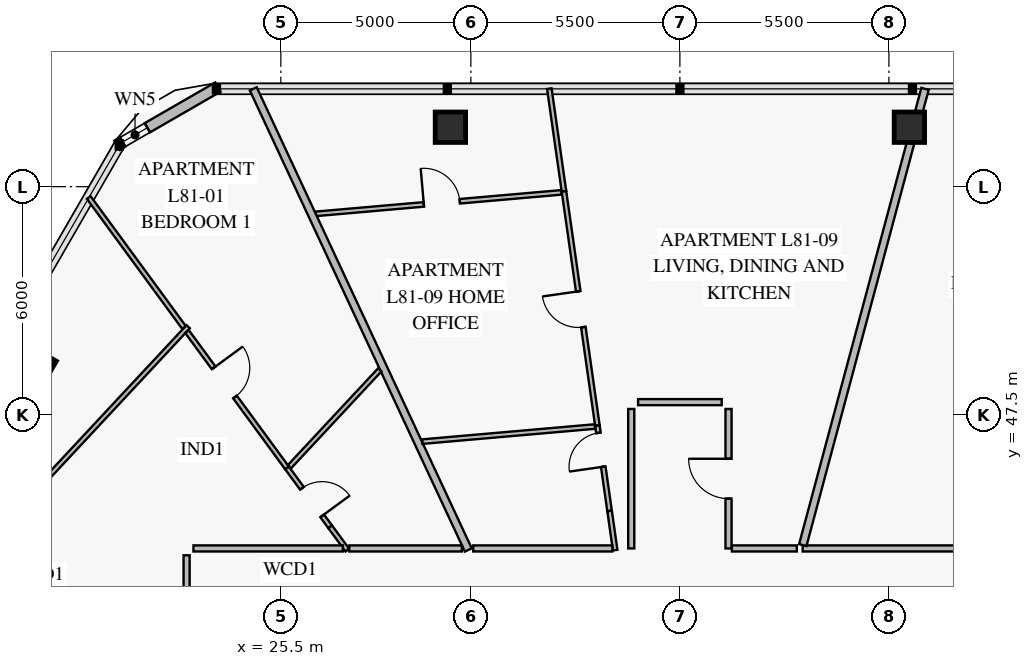
"""IFC4 building model, lengths in metres.
Left out: names, types, materials, properties, quantities, classifications, styles, units other than length and angle.
Written with IfcOpenShell. Run it as: python <this file> out.ifc"""

import sys

from ifc_helpers import new_model, si_unit, direction, frame, frame_2d, origin, origin_2d, place, context, subcontext, project, spatial, rectangle, extrude, element, fill, save


model = new_model("IFC4")
c1 = context("Model", 3, precision=1e-05, world=origin(), true_north=direction((0.0, 1.0)))
c2 = subcontext(c1, "Body", "Model", "MODEL_VIEW")
j1 = project(units=[si_unit("LENGTHUNIT", "METRE"), si_unit("PLANEANGLEUNIT", "RADIAN")], contexts=[c1])
p1 = place(None, origin())
s1 = spatial("IfcSite", under=j1, at=p1, CompositionType="ELEMENT")
p2 = place(p1, origin())
s2 = spatial("IfcBuilding", under=s1, at=p2, CompositionType="ELEMENT")
p3 = place(p2, frame((0.0, 0.0, 319.6)))
s3 = spatial("IfcBuildingStorey", under=s2, at=p3, CompositionType="ELEMENT", Elevation=319.6)
for number, where, z_axis, x_axis in (
    (1, (42.039, 55.064, 0.0), (0.0, 0.0, 1.0), (-1.0, 0.0, 0.0)),
    (2, (29.961, 55.064, 0.0), (0.0, 0.0, 1.0), (-1.0, 0.0, 0.0)),
    (3, (19.045, 48.762, 0.0), (0.0, 0.0, 1.0), (-0.5, -0.866, 0.0)),
):
    element("IfcColumn", number, at=place(p3, frame(where, z_axis=z_axis, x_axis=x_axis)), inside=s3, PredefinedType="COLUMN", context=c2, shape_type="SweptSolid", body=[
        extrude(rectangle(XDim=0.8, YDim=0.8, at=origin_2d()), origin(), (0.0, 0.0, 1.0), 3.55),
    ])
p4 = place(p3, frame((21.189, 54.589, 0.0), z_axis=(0.0, 0.0, 1.0), x_axis=(0.866023752521, 0.50000286006, 0.0)))
e4 = element("IfcWall", 4, at=p4, inside=s3, PredefinedType="SOLIDWALL", context=c2, shape_type="SweptSolid", body=[
    extrude(rectangle(XDim=3.065, YDim=0.28, at=frame_2d((1.532, 0.0))), origin(), (0.0, 0.0, 1.0), 3.55),
])
p5 = place(p4, frame((0.173, 0.0, 0.85)))
e5 = element("IfcOpeningElement", 5, at=p5, cuts=e4, PredefinedType="OPENING", context=c2, shape_type="SweptSolid", body=[
    extrude(rectangle(XDim=0.75, YDim=1.5, at=frame_2d((0.375, 0.75))), frame((0.0, 0.152, 0.0), z_axis=(0.0, -1.0, 0.0), x_axis=(1.0, 0.0, 0.0)), (0.0, 0.0, 1.0), 0.304),
])
p6 = place(p3, frame((23.062, 49.815, 0.0), z_axis=(0.0, 0.0, 1.0), x_axis=(-0.681996709379, -0.731355240903, 0.0)))
e6 = element("IfcWall", 6, at=p6, inside=s3, PredefinedType="PARTITIONING", context=c2, shape_type="SweptSolid", body=[
    extrude(rectangle(XDim=12.826, YDim=0.12, at=frame_2d((6.413, 0.0))), origin(), (0.0, 0.0, 1.0), 2.97),
])
p7 = place(p6, frame((5.938, 0.0, 0.0)))
e7 = element("IfcOpeningElement", 7, at=p7, cuts=e6, PredefinedType="OPENING", context=c2, shape_type="SweptSolid", body=[
    extrude(rectangle(XDim=0.95, YDim=2.1, at=frame_2d((0.475, 1.05))), frame((0.0, 0.072, 0.0), z_axis=(0.0, -1.0, 0.0), x_axis=(1.0, 0.0, 0.0)), (0.0, 0.0, 1.0), 0.144),
])
p8 = place(p3, frame((26.798, 44.55, 0.0), z_axis=(0.0, 0.0, 1.0), x_axis=(-0.591341620245, 0.80642116054, 0.0)))
e8 = element("IfcWall", 8, at=p8, inside=s3, PredefinedType="PARTITIONING", context=c2, shape_type="SweptSolid", body=[
    extrude(rectangle(XDim=1.921, YDim=0.12, at=frame_2d((0.96, 0.0))), origin(), (0.0, 0.0, 1.0), 3.55),
])
p9 = place(p8, frame((0.357, 0.0, 0.0)))
e9 = element("IfcOpeningElement", 9, at=p9, cuts=e8, PredefinedType="OPENING", context=c2, shape_type="SweptSolid", body=[
    extrude(rectangle(XDim=0.9, YDim=2.1, at=frame_2d((0.45, 1.05))), frame((0.0, 0.072, 0.0), z_axis=(0.0, -1.0, 0.0), x_axis=(1.0, 0.0, 0.0)), (0.0, 0.0, 1.0), 0.144),
])
p10 = place(p3, frame((25.662, 46.099, 0.0), z_axis=(0.0, 0.0, 1.0), x_axis=(-0.591311292855, 0.806443398474, 0.0)))
e10 = element("IfcWall", 10, at=p10, inside=s3, PredefinedType="PARTITIONING", context=c2, shape_type="SweptSolid", body=[
    extrude(rectangle(XDim=4.446, YDim=0.12, at=frame_2d((2.223, 0.0))), origin(), (0.0, 0.0, 1.0), 3.55),
])
p11 = place(p10, frame((2.314, 0.0, 0.0)))
e11 = element("IfcOpeningElement", 11, at=p11, cuts=e10, PredefinedType="OPENING", context=c2, shape_type="SweptSolid", body=[
    extrude(rectangle(XDim=0.95, YDim=2.1, at=frame_2d((0.475, 1.05))), frame((0.0, 0.072, 0.0), z_axis=(0.0, -1.0, 0.0), x_axis=(1.0, 0.0, 0.0)), (0.0, 0.0, 1.0), 0.144),
])
p12 = place(p3, frame((22.951, 49.796, 0.0), z_axis=(0.0, 0.0, 1.0), x_axis=(-0.591303744842, 0.806448932875, 0.0)))
e12 = element("IfcWall", 12, at=p12, inside=s3, PredefinedType="PARTITIONING", context=c2, shape_type="SweptSolid", body=[
    extrude(rectangle(XDim=4.24, YDim=0.12, at=frame_2d((2.12, 0.0))), origin(), (0.0, 0.0, 1.0), 2.97),
])
p13 = place(p3, frame((23.02, 43.8, 0.0), z_axis=(0.0, 0.0, 1.0), x_axis=(0.0, -1.0, 0.0)))
e13 = element("IfcWall", 13, at=p13, inside=s3, PredefinedType="PARTITIONING", context=c2, shape_type="SweptSolid", body=[
    extrude(rectangle(XDim=6.666, YDim=0.16, at=frame_2d((3.333, 0.0))), origin(), (0.0, 0.0, 1.0), 3.55),
])
p14 = place(p13, frame((2.808, 0.0, 0.0)))
e14 = element("IfcOpeningElement", 14, at=p14, cuts=e13, PredefinedType="OPENING", context=c2, shape_type="SweptSolid", body=[
    extrude(rectangle(XDim=1.05, YDim=2.15, at=frame_2d((0.525, 1.075))), frame((0.0, 0.092, 0.0), z_axis=(0.0, -1.0, 0.0), x_axis=(1.0, 0.0, 0.0)), (0.0, 0.0, 1.0), 0.184),
])
p15 = place(p3, frame((48.8, 43.98, 0.0), z_axis=(0.0, 0.0, 1.0), x_axis=(-1.0, 0.0, 0.0)))
e15 = element("IfcWall", 15, at=p15, inside=s3, PredefinedType="PARTITIONING", context=c2, shape_type="SweptSolid", body=[
    extrude(rectangle(XDim=9.569, YDim=0.16, at=frame_2d((4.785, 0.0))), origin(), (0.0, 0.0, 1.0), 3.0),
])
p16 = place(p15, frame((4.21, 0.0, 0.0)))
e16 = element("IfcOpeningElement", 16, at=p16, cuts=e15, PredefinedType="OPENING", context=c2, shape_type="SweptSolid", body=[
    extrude(rectangle(XDim=1.15, YDim=2.2, at=frame_2d((0.575, 1.1))), frame((0.0, 0.092, 0.0), z_axis=(0.0, -1.0, 0.0), x_axis=(1.0, 0.0, 0.0)), (0.0, 0.0, 1.0), 0.184),
])
p17 = place(p3, frame((34.15, 44.966, 0.0), z_axis=(0.0, 0.0, 1.0), x_axis=(-0.141196039745, 0.989981655568, 0.0)))
e17 = element("IfcWall", 17, at=p17, inside=s3, PredefinedType="PARTITIONING", context=c2, shape_type="SweptSolid", body=[
    extrude(rectangle(XDim=2.275, YDim=0.12, at=frame_2d((1.138, 0.0))), origin(), (0.0, 0.0, 1.0), 3.55),
])
p18 = place(p17, frame((1.175, 0.0, 0.0)))
e18 = element("IfcOpeningElement", 18, at=p18, cuts=e17, PredefinedType="OPENING", context=c2, shape_type="SweptSolid", body=[
    extrude(rectangle(XDim=0.9, YDim=2.1, at=frame_2d((0.45, 1.05))), frame((0.0, 0.072, 0.0), z_axis=(0.0, -1.0, 0.0), x_axis=(1.0, 0.0, 0.0)), (0.0, 0.0, 1.0), 0.144),
])
p19 = place(p3, frame((33.829, 47.219, 0.0), z_axis=(0.0, 0.0, 1.0), x_axis=(-0.141245630481, 0.989974581426, 0.0)))
e19 = element("IfcWall", 19, at=p19, inside=s3, PredefinedType="PARTITIONING", context=c2, shape_type="SweptSolid", body=[
    extrude(rectangle(XDim=6.224, YDim=0.12, at=frame_2d((3.112, 0.0))), origin(), (0.0, 0.0, 1.0), 3.2),
])
p20 = place(p19, frame((2.612, 0.0, 0.0)))
e20 = element("IfcOpeningElement", 20, at=p20, cuts=e19, PredefinedType="OPENING", context=c2, shape_type="SweptSolid", body=[
    extrude(rectangle(XDim=0.95, YDim=2.1, at=frame_2d((0.475, 1.05))), frame((0.0, 0.072, 0.0), z_axis=(0.0, -1.0, 0.0), x_axis=(1.0, 0.0, 0.0)), (0.0, 0.0, 1.0), 0.144),
])
p21 = place(p3, frame((32.885, 53.35, 0.0), z_axis=(0.0, 0.0, 1.0), x_axis=(-0.996192737693, -0.087178147311, 0.0)))
e21 = element("IfcWall", 21, at=p21, inside=s3, PredefinedType="PARTITIONING", context=c2, shape_type="SweptSolid", body=[
    extrude(rectangle(XDim=6.491, YDim=0.12, at=frame_2d((3.246, 0.0))), origin(), (0.0, 0.0, 1.0), 3.0),
])
p22 = place(p21, frame((2.687, 0.0, 0.0)))
e22 = element("IfcOpeningElement", 22, at=p22, cuts=e21, PredefinedType="OPENING", context=c2, shape_type="SweptSolid", body=[
    extrude(rectangle(XDim=0.95, YDim=2.1, at=frame_2d((0.475, 1.05))), frame((0.0, 0.072, 0.0), z_axis=(0.0, -1.0, 0.0), x_axis=(1.0, 0.0, 0.0)), (0.0, 0.0, 1.0), 0.144),
])
p23 = place(p3, frame((37.28, 43.98, 0.0), z_axis=(0.0, 0.0, 1.0), x_axis=(0.0, 1.0, 0.0)))
e23 = element("IfcWall", 23, at=p23, inside=s3, PredefinedType="PARTITIONING", context=c2, shape_type="SweptSolid", body=[
    extrude(rectangle(XDim=3.67, YDim=0.16, at=frame_2d((1.835, 0.0))), origin(), (0.0, 0.0, 1.0), 3.55),
])
p24 = place(p23, frame((1.31, 0.0, 0.0)))
e24 = element("IfcOpeningElement", 24, at=p24, cuts=e23, PredefinedType="OPENING", context=c2, shape_type="SweptSolid", body=[
    extrude(rectangle(XDim=1.05, YDim=2.15, at=frame_2d((0.525, 1.075))), frame((0.0, 0.092, 0.0), z_axis=(0.0, -1.0, 0.0), x_axis=(1.0, 0.0, 0.0)), (0.0, 0.0, 1.0), 0.184),
])
p25 = place(p3, frame((30.432, 43.94, 0.0), z_axis=(0.0, 0.0, 1.0), x_axis=(-0.422611922644, 0.906310742979, 0.0)))
e25 = element("IfcWall", 25, at=p25, inside=s3, PredefinedType="PARTITIONING", context=c2, shape_type="SweptSolid", body=[
    extrude(rectangle(XDim=13.389, YDim=0.2, at=frame_2d((6.694, 0.0))), origin(), (0.0, 0.0, 1.0), 2.97),
])
p26 = place(p3, frame((27.249, 43.935, 0.0), z_axis=(0.0, 0.0, 1.0), x_axis=(-0.591099878677, 0.806598371824, 0.0)))
e26 = element("IfcWall", 26, at=p26, inside=s3, PredefinedType="PARTITIONING", context=c2, shape_type="SweptSolid", body=[
    extrude(rectangle(XDim=0.762, YDim=0.12, at=frame_2d((0.381, 0.0))), origin(), (0.0, 0.0, 1.0), 3.55),
])
p27 = place(p3, frame((28.103, 48.68, 0.0), z_axis=(0.0, 0.0, 1.0), x_axis=(-0.681964001054, -0.731385740404, 0.0)))
e27 = element("IfcWall", 27, at=p27, inside=s3, PredefinedType="PARTITIONING", context=c2, shape_type="SweptSolid", body=[
    extrude(rectangle(XDim=3.488, YDim=0.12, at=frame_2d((1.744, 0.0))), origin(), (0.0, 0.0, 1.0), 3.55),
])
p28 = place(p3, frame((39.234, 44.068, 0.0), z_axis=(0.0, 0.0, 1.0), x_axis=(0.258812989646, 0.965927448823, 0.0)))
e28 = element("IfcWall", 28, at=p28, inside=s3, PredefinedType="PARTITIONING", context=c2, shape_type="SweptSolid", body=[
    extrude(rectangle(XDim=10.949, YDim=0.2, at=frame_2d((5.475, 0.0))), origin(), (0.0, 0.0, 1.0), 3.0),
])
p29 = place(p3, frame((42.292, 55.484, 0.0), z_axis=(0.0, 0.0, 1.0), x_axis=(0.258955805871, 0.965889170974, 0.0)))
e29 = element("IfcWall", 29, at=p29, inside=s3, PredefinedType="PARTITIONING", context=c2, shape_type="SweptSolid", body=[
    extrude(rectangle(XDim=0.611, YDim=0.2, at=frame_2d((0.305, 0.0))), origin(), (0.0, 0.0, 1.0), 3.122),
])
p30 = place(p3, frame((34.297, 43.935, 0.0), z_axis=(0.0, 0.0, 1.0), x_axis=(-0.141355718114, 0.989958868316, 0.0)))
e30 = element("IfcWall", 30, at=p30, inside=s3, PredefinedType="PARTITIONING", context=c2, shape_type="SweptSolid", body=[
    extrude(rectangle(XDim=1.042, YDim=0.12, at=frame_2d((0.521, 0.0))), origin(), (0.0, 0.0, 1.0), 3.55),
])
p31 = place(p3, frame((32.949, 53.381, 0.0), z_axis=(0.0, 0.0, 1.0), x_axis=(-0.141258329488, 0.989972769499, 0.0)))
e31 = element("IfcWall", 31, at=p31, inside=s3, PredefinedType="PARTITIONING", context=c2, shape_type="SweptSolid", body=[
    extrude(rectangle(XDim=2.726, YDim=0.12, at=frame_2d((1.363, 0.0))), origin(), (0.0, 0.0, 1.0), 2.97),
])
p32 = place(p3, frame((33.764, 47.188, 0.0), z_axis=(0.0, 0.0, 1.0), x_axis=(-0.996198075211, -0.087117133479, 0.0)))
e32 = element("IfcWall", 32, at=p32, inside=s3, PredefinedType="PARTITIONING", context=c2, shape_type="SweptSolid", body=[
    extrude(rectangle(XDim=4.56, YDim=0.12, at=frame_2d((2.28, 0.0))), origin(), (0.0, 0.0, 1.0), 3.0),
])
p33 = place(p3, frame((27.132, 43.98, 0.0), z_axis=(0.0, 0.0, 1.0), x_axis=(-1.0, 0.0, 0.0)))
e33 = element("IfcWall", 33, at=p33, inside=s3, PredefinedType="PARTITIONING", context=c2, shape_type="SweptSolid", body=[
    extrude(rectangle(XDim=3.932, YDim=0.16, at=frame_2d((1.966, 0.0))), origin(), (0.0, 0.0, 1.0), 3.0),
])
p34 = place(p3, frame((30.264, 43.98, 0.0), z_axis=(0.0, 0.0, 1.0), x_axis=(-1.0, 0.0, 0.0)))
e34 = element("IfcWall", 34, at=p34, inside=s3, PredefinedType="PARTITIONING", context=c2, shape_type="SweptSolid", body=[
    extrude(rectangle(XDim=2.963, YDim=0.16, at=frame_2d((1.482, 0.0))), origin(), (0.0, 0.0, 1.0), 3.55),
])
p35 = place(p3, frame((34.72, 47.65, 0.0), z_axis=(0.0, 0.0, 1.0), x_axis=(0.0, -1.0, 0.0)))
e35 = element("IfcWall", 35, at=p35, inside=s3, PredefinedType="PARTITIONING", context=c2, shape_type="SweptSolid", body=[
    extrude(rectangle(XDim=3.67, YDim=0.16, at=frame_2d((1.835, 0.0))), origin(), (0.0, 0.0, 1.0), 3.55),
])
p36 = place(p3, frame((37.1, 47.83, 0.0), z_axis=(0.0, 0.0, 1.0), x_axis=(-1.0, 0.0, 0.0)))
e36 = element("IfcWall", 36, at=p36, inside=s3, PredefinedType="PARTITIONING", context=c2, shape_type="SweptSolid", body=[
    extrude(rectangle(XDim=2.2, YDim=0.16, at=frame_2d((1.1, 0.0))), origin(), (0.0, 0.0, 1.0), 3.55),
])
p37 = place(p3, frame((39.078, 43.98, 0.0), z_axis=(0.0, 0.0, 1.0), x_axis=(-1.0, 0.0, 0.0)))
e37 = element("IfcWall", 37, at=p37, inside=s3, PredefinedType="PARTITIONING", context=c2, shape_type="SweptSolid", body=[
    extrude(rectangle(XDim=1.71, YDim=0.16, at=frame_2d((0.855, 0.0))), origin(), (0.0, 0.0, 1.0), 3.0),
])
p38 = place(p3, frame((34.222, 43.98, 0.0), z_axis=(0.0, 0.0, 1.0), x_axis=(-1.0, 0.0, 0.0)))
e38 = element("IfcWall", 38, at=p38, inside=s3, PredefinedType="PARTITIONING", context=c2, shape_type="SweptSolid", body=[
    extrude(rectangle(XDim=3.659, YDim=0.16, at=frame_2d((1.83, 0.0))), origin(), (0.0, 0.0, 1.0), 3.0),
])
p39 = place(p5, origin())
e39 = element("IfcWindow", 39, at=p39, inside=s3, PartitioningType="SINGLE_PANEL", PredefinedType="WINDOW", context=c2, shape_type="SweptSolid", body=[
    extrude(rectangle(XDim=0.75, YDim=1.5, at=frame_2d((0.375, 0.75))), frame((0.0, 0.03, 0.0), z_axis=(0.0, -1.0, 0.0), x_axis=(1.0, 0.0, 0.0)), (0.0, 0.0, 1.0), 0.06),
])
fill(e5, e39)
p40 = place(p9, frame((0.9, 0.0, 0.0), z_axis=(0.0, 0.0, 1.0), x_axis=(-1.0, 0.0, 0.0)))
e40 = element("IfcDoor", 40, at=p40, inside=s3, OperationType="SINGLE_SWING_RIGHT", PredefinedType="DOOR", context=c2, shape_type="SweptSolid", body=[
    extrude(rectangle(XDim=0.9, YDim=2.1, at=frame_2d((0.45, 1.05))), frame((0.0, 0.025, 0.0), z_axis=(0.0, -1.0, 0.0), x_axis=(1.0, 0.0, 0.0)), (0.0, 0.0, 1.0), 0.05),
])
fill(e9, e40)
p41 = place(p11, frame((0.95, 0.0, 0.0), z_axis=(0.0, 0.0, 1.0), x_axis=(-1.0, 0.0, 0.0)))
e41 = element("IfcDoor", 41, at=p41, inside=s3, OperationType="SINGLE_SWING_LEFT", PredefinedType="DOOR", context=c2, shape_type="SweptSolid", body=[
    extrude(rectangle(XDim=0.95, YDim=2.1, at=frame_2d((0.475, 1.05))), frame((0.0, 0.025, 0.0), z_axis=(0.0, -1.0, 0.0), x_axis=(1.0, 0.0, 0.0)), (0.0, 0.0, 1.0), 0.05),
])
fill(e11, e41)
p42 = place(p18, origin())
e42 = element("IfcDoor", 42, at=p42, inside=s3, OperationType="SINGLE_SWING_LEFT", PredefinedType="DOOR", context=c2, shape_type="SweptSolid", body=[
    extrude(rectangle(XDim=0.9, YDim=2.1, at=frame_2d((0.45, 1.05))), frame((0.0, 0.025, 0.0), z_axis=(0.0, -1.0, 0.0), x_axis=(1.0, 0.0, 0.0)), (0.0, 0.0, 1.0), 0.05),
])
fill(e18, e42)
p43 = place(p20, origin())
e43 = element("IfcDoor", 43, at=p43, inside=s3, OperationType="SINGLE_SWING_RIGHT", PredefinedType="DOOR", context=c2, shape_type="SweptSolid", body=[
    extrude(rectangle(XDim=0.95, YDim=2.1, at=frame_2d((0.475, 1.05))), frame((0.0, 0.025, 0.0), z_axis=(0.0, -1.0, 0.0), x_axis=(1.0, 0.0, 0.0)), (0.0, 0.0, 1.0), 0.05),
])
fill(e20, e43)
p44 = place(p22, frame((0.95, 0.0, 0.0), z_axis=(0.0, 0.0, 1.0), x_axis=(-1.0, 0.0, 0.0)))
e44 = element("IfcDoor", 44, at=p44, inside=s3, OperationType="SINGLE_SWING_LEFT", PredefinedType="DOOR", context=c2, shape_type="SweptSolid", body=[
    extrude(rectangle(XDim=0.95, YDim=2.1, at=frame_2d((0.475, 1.05))), frame((0.0, 0.025, 0.0), z_axis=(0.0, -1.0, 0.0), x_axis=(1.0, 0.0, 0.0)), (0.0, 0.0, 1.0), 0.05),
])
fill(e22, e44)
p45 = place(p24, origin())
e45 = element("IfcDoor", 45, at=p45, inside=s3, OperationType="SINGLE_SWING_RIGHT", PredefinedType="DOOR", context=c2, shape_type="SweptSolid", body=[
    extrude(rectangle(XDim=1.05, YDim=2.15, at=frame_2d((0.525, 1.075))), frame((0.0, 0.025, 0.0), z_axis=(0.0, -1.0, 0.0), x_axis=(1.0, 0.0, 0.0)), (0.0, 0.0, 1.0), 0.05),
])
fill(e24, e45)
save(model, sys.argv[1])
